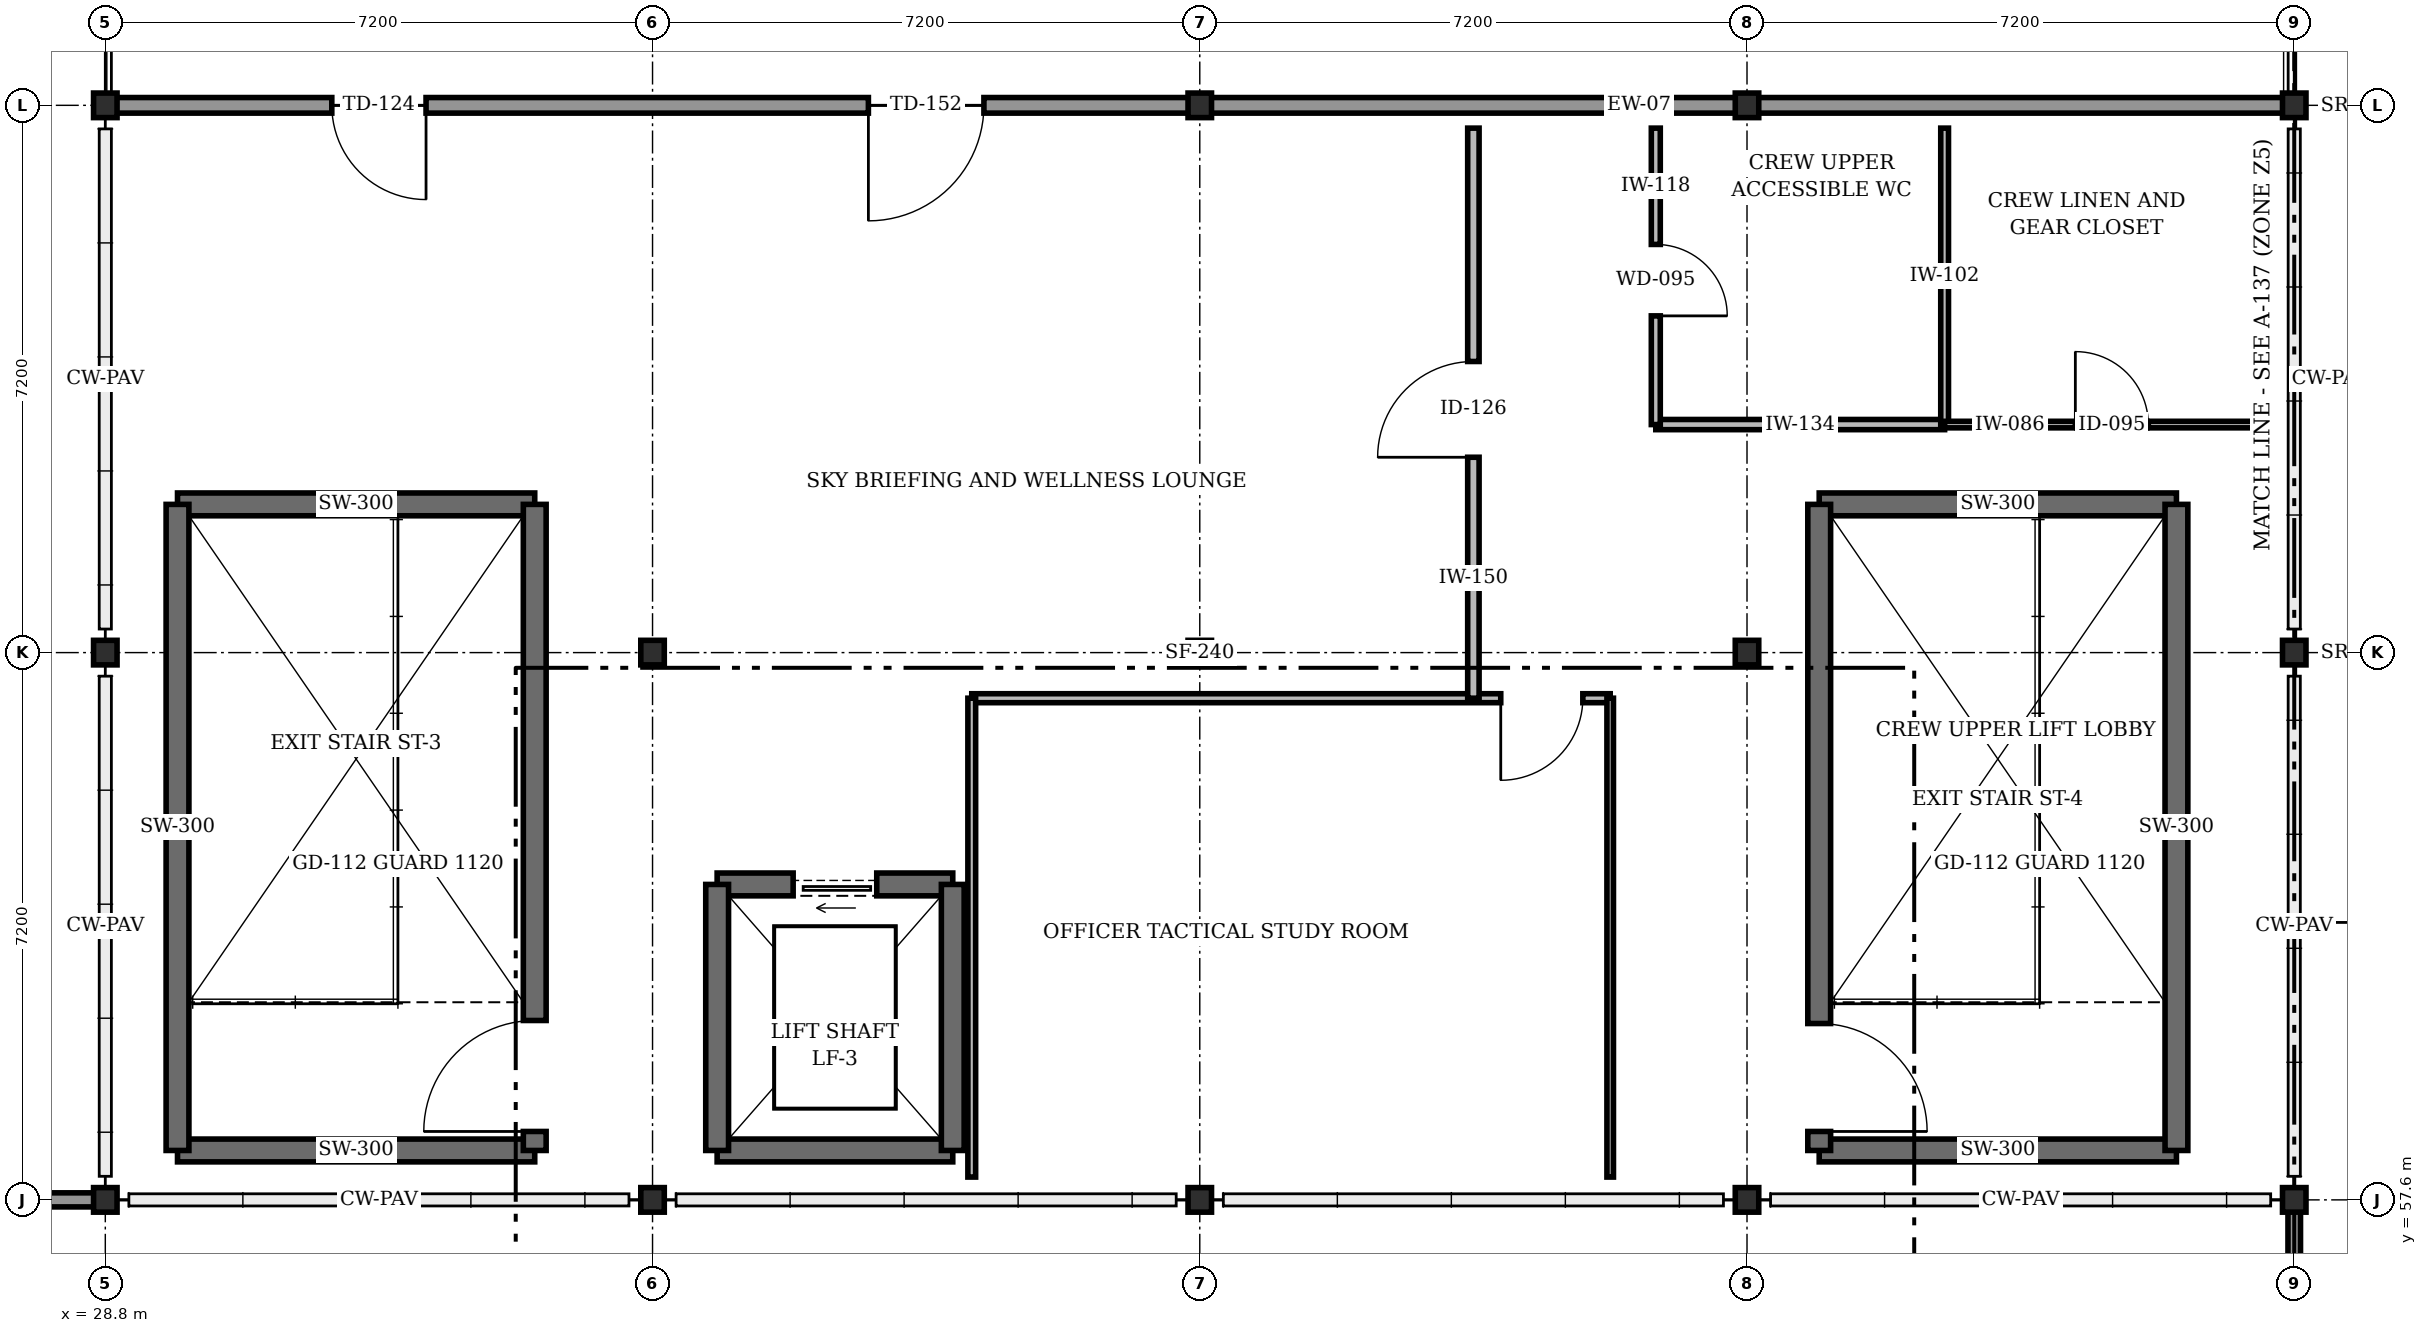
"""IFC4 building model, lengths in metres.
Left out: names, types, materials, properties, quantities, classifications, styles, units other than length and angle.
Written with IfcOpenShell. Run it as: python <this file> out.ifc"""

import sys

from ifc_helpers import new_model, si_unit, direction, frame, frame_2d, origin, origin_2d, place, context, subcontext, project, spatial, rectangle, i_section, extrude, element, fill, save


model = new_model("IFC4")
c1 = context("Model", 3, precision=1e-05, world=origin(), true_north=direction((0.0, 1.0)))
c2 = subcontext(c1, "Body", "Model", "MODEL_VIEW")
j1 = project(units=[si_unit("LENGTHUNIT", "METRE"), si_unit("PLANEANGLEUNIT", "RADIAN")], contexts=[c1])
p1 = place(None, origin())
s1 = spatial("IfcSite", under=j1, at=p1, CompositionType="ELEMENT")
p2 = place(p1, origin())
s2 = spatial("IfcBuilding", under=s1, at=p2, CompositionType="ELEMENT")
p3 = place(p2, frame((0.0, 0.0, 18.0)))
s3 = spatial("IfcBuildingStorey", under=s2, at=p3, CompositionType="ELEMENT", Elevation=18.0)
for number, where, z_axis, x_axis in (
    (1, (28.8, 57.6, 0.0), (0.0, 0.0, 1.0), (1.0, 0.0, 0.0)),
    (2, (28.8, 64.8, 0.0), (0.0, 0.0, 1.0), (1.0, 0.0, 0.0)),
    (3, (28.8, 72.0, 0.0), (0.0, 0.0, 1.0), (1.0, 0.0, 0.0)),
    (4, (36.0, 57.6, 0.0), (0.0, 0.0, 1.0), (1.0, 0.0, 0.0)),
    (5, (36.0, 64.8, 0.0), (0.0, 0.0, 1.0), (1.0, 0.0, 0.0)),
    (6, (43.2, 57.6, 0.0), (0.0, 0.0, 1.0), (1.0, 0.0, 0.0)),
    (7, (43.2, 64.8, 0.0), (0.0, 0.0, 1.0), (1.0, 0.0, 0.0)),
    (8, (43.2, 72.0, 0.0), (0.0, 0.0, 1.0), (1.0, 0.0, 0.0)),
    (9, (50.4, 57.6, 0.0), (0.0, 0.0, 1.0), (1.0, 0.0, 0.0)),
    (10, (50.4, 64.8, 0.0), (0.0, 0.0, 1.0), (1.0, 0.0, 0.0)),
    (11, (50.4, 72.0, 0.0), (0.0, 0.0, 1.0), (1.0, 0.0, 0.0)),
    (12, (57.6, 57.6, 0.0), (0.0, 0.0, 1.0), (1.0, 0.0, 0.0)),
    (13, (57.6, 64.8, 0.0), (0.0, 0.0, 1.0), (1.0, 0.0, 0.0)),
    (14, (57.6, 72.0, 0.0), (0.0, 0.0, 1.0), (1.0, 0.0, 0.0)),
):
    element("IfcColumn", number, at=place(p3, frame(where, z_axis=z_axis, x_axis=x_axis)), inside=s3, PredefinedType="COLUMN", context=c2, shape_type="SweptSolid", body=[
        extrude(i_section(OverallWidth=0.309, OverallDepth=0.323, WebThickness=0.014, FlangeThickness=0.023, at=origin_2d()), origin(), (0.0, 0.0, 1.0), 4.2),
    ])
p4 = place(p3, frame((57.6, 72.0, 0.0), z_axis=(0.0, 0.0, 1.0), x_axis=(-1.0, 0.0, 0.0)))
e15 = element("IfcWall", 15, at=p4, inside=s3, PredefinedType="STANDARD", context=c2, shape_type="SweptSolid", body=[
    extrude(rectangle(XDim=28.8, YDim=0.205, at=frame_2d((14.4, 0.0))), origin(), (0.0, 0.0, 1.0), 3.139),
])
p5 = place(p4, frame((17.24, 0.0, 0.0)))
e16 = element("IfcOpeningElement", 16, at=p5, cuts=e15, PredefinedType="OPENING", context=c2, shape_type="SweptSolid", body=[
    extrude(rectangle(XDim=1.52, YDim=2.26, at=frame_2d((0.76, 1.13))), frame((0.0, 0.113, 0.0), z_axis=(0.0, -1.0, 0.0), x_axis=(1.0, 0.0, 0.0)), (0.0, 0.0, 1.0), 0.225),
])
p6 = place(p4, frame((24.58, 0.0, 0.0)))
e17 = element("IfcOpeningElement", 17, at=p6, cuts=e15, PredefinedType="OPENING", context=c2, shape_type="SweptSolid", body=[
    extrude(rectangle(XDim=1.24, YDim=2.2, at=frame_2d((0.62, 1.1))), frame((0.0, 0.113, 0.0), z_axis=(0.0, -1.0, 0.0), x_axis=(1.0, 0.0, 0.0)), (0.0, 0.0, 1.0), 0.225),
])
p7 = place(p3, frame((28.8, 57.6, 0.0), z_axis=(0.0, 0.0, 1.0), x_axis=(-1.0, 0.0, 0.0)))
e18 = element("IfcWall", 18, at=p7, inside=s3, PredefinedType="PARAPET", context=c2, shape_type="SweptSolid", body=[
    extrude(rectangle(XDim=3.6, YDim=0.185, at=frame_2d((1.8, 0.0))), origin(), (0.0, 0.0, 1.0), 1.15),
])
p8 = place(p3, frame((57.6, 21.6, 0.0), z_axis=(0.0, 0.0, 1.0), x_axis=(0.0, 1.0, 0.0)))
e19 = element("IfcWall", 19, at=p8, inside=s3, PredefinedType="PARAPET", context=c2, shape_type="SweptSolid", body=[
    extrude(rectangle(XDim=36.0, YDim=0.165, at=frame_2d((18.0, 0.0))), origin(), (0.0, 0.0, 1.0), 1.15),
])
for number, where, z_axis, x_axis in (
    (20, (29.75, 58.25, 0.0), (0.0, 0.0, 1.0), (1.0, 0.0, 0.0)),
    (21, (34.45, 66.75, 0.0), (0.0, 0.0, 1.0), (-1.0, 0.0, 0.0)),
):
    element("IfcWall", number, at=place(p3, frame(where, z_axis=z_axis, x_axis=x_axis)), inside=s3, PredefinedType="SHEAR", context=c2, shape_type="SweptSolid", body=[
        extrude(rectangle(XDim=4.7, YDim=0.3, at=frame_2d((2.35, 0.0))), origin(), (0.0, 0.0, 1.0), 3.975),
    ])
p9 = place(p3, frame((29.75, 66.75, 0.0), z_axis=(0.0, 0.0, 1.0), x_axis=(0.0, -1.0, 0.0)))
e22 = element("IfcWall", 22, at=p9, inside=s3, PredefinedType="SHEAR", context=c2, shape_type="SweptSolid", body=[
    extrude(rectangle(XDim=8.5, YDim=0.3, at=frame_2d((4.25, 0.0))), origin(), (0.0, 0.0, 1.0), 3.975),
])
p10 = place(p3, frame((34.45, 58.25, 0.0), z_axis=(0.0, 0.0, 1.0), x_axis=(0.0, 1.0, 0.0)))
e23 = element("IfcWall", 23, at=p10, inside=s3, PredefinedType="SHEAR", context=c2, shape_type="SweptSolid", body=[
    extrude(rectangle(XDim=8.5, YDim=0.3, at=frame_2d((4.25, 0.0))), origin(), (0.0, 0.0, 1.0), 3.975),
])
p11 = place(p10, frame((0.25, 0.0, 0.0)))
e24 = element("IfcOpeningElement", 24, at=p11, cuts=e23, PredefinedType="OPENING", context=c2, shape_type="SweptSolid", body=[
    extrude(rectangle(XDim=1.46, YDim=2.24, at=frame_2d((0.73, 1.12))), frame((0.0, 0.16, 0.0), z_axis=(0.0, -1.0, 0.0), x_axis=(1.0, 0.0, 0.0)), (0.0, 0.0, 1.0), 0.32),
])
p12 = place(p3, frame((36.85, 58.25, 0.0), z_axis=(0.0, 0.0, 1.0), x_axis=(1.0, 0.0, 0.0)))
e25 = element("IfcWall", 25, at=p12, inside=s3, PredefinedType="SHEAR", context=c2, shape_type="SweptSolid", body=[
    extrude(rectangle(XDim=3.1, YDim=0.3, at=frame_2d((1.55, 0.0))), origin(), (0.0, 0.0, 1.0), 3.975),
])
p13 = place(p3, frame((39.95, 61.75, 0.0), z_axis=(0.0, 0.0, 1.0), x_axis=(-1.0, 0.0, 0.0)))
e26 = element("IfcWall", 26, at=p13, inside=s3, PredefinedType="SHEAR", context=c2, shape_type="SweptSolid", body=[
    extrude(rectangle(XDim=3.1, YDim=0.3, at=frame_2d((1.55, 0.0))), origin(), (0.0, 0.0, 1.0), 3.975),
])
p14 = place(p13, frame((1.0, 0.0, 0.0)))
e27 = element("IfcOpeningElement", 27, at=p14, cuts=e26, PredefinedType="OPENING", context=c2, shape_type="SweptSolid", body=[
    extrude(rectangle(XDim=1.1, YDim=2.22, at=frame_2d((0.55, 1.11))), frame((0.0, 0.16, 0.0), z_axis=(0.0, -1.0, 0.0), x_axis=(1.0, 0.0, 0.0)), (0.0, 0.0, 1.0), 0.32),
])
for number, where, z_axis, x_axis in (
    (28, (36.85, 61.75, 0.0), (0.0, 0.0, 1.0), (0.0, -1.0, 0.0)),
    (29, (39.95, 58.25, 0.0), (0.0, 0.0, 1.0), (0.0, 1.0, 0.0)),
):
    element("IfcWall", number, at=place(p3, frame(where, z_axis=z_axis, x_axis=x_axis)), inside=s3, PredefinedType="SHEAR", context=c2, shape_type="SweptSolid", body=[
        extrude(rectangle(XDim=3.5, YDim=0.3, at=frame_2d((1.75, 0.0))), origin(), (0.0, 0.0, 1.0), 3.975),
    ])
for number, where, z_axis, x_axis in (
    (30, (51.35, 58.25, 0.0), (0.0, 0.0, 1.0), (1.0, 0.0, 0.0)),
    (31, (56.05, 66.75, 0.0), (0.0, 0.0, 1.0), (-1.0, 0.0, 0.0)),
):
    element("IfcWall", number, at=place(p3, frame(where, z_axis=z_axis, x_axis=x_axis)), inside=s3, PredefinedType="SHEAR", context=c2, shape_type="SweptSolid", body=[
        extrude(rectangle(XDim=4.7, YDim=0.3, at=frame_2d((2.35, 0.0))), origin(), (0.0, 0.0, 1.0), 3.975),
    ])
p15 = place(p3, frame((51.35, 66.75, 0.0), z_axis=(0.0, 0.0, 1.0), x_axis=(0.0, -1.0, 0.0)))
e32 = element("IfcWall", 32, at=p15, inside=s3, PredefinedType="SHEAR", context=c2, shape_type="SweptSolid", body=[
    extrude(rectangle(XDim=8.5, YDim=0.3, at=frame_2d((4.25, 0.0))), origin(), (0.0, 0.0, 1.0), 3.975),
])
p16 = place(p15, frame((6.83, 0.0, 0.0)))
e33 = element("IfcOpeningElement", 33, at=p16, cuts=e32, PredefinedType="OPENING", context=c2, shape_type="SweptSolid", body=[
    extrude(rectangle(XDim=1.42, YDim=2.22, at=frame_2d((0.71, 1.11))), frame((0.0, 0.16, 0.0), z_axis=(0.0, -1.0, 0.0), x_axis=(1.0, 0.0, 0.0)), (0.0, 0.0, 1.0), 0.32),
])
p17 = place(p3, frame((56.05, 58.25, 0.0), z_axis=(0.0, 0.0, 1.0), x_axis=(0.0, 1.0, 0.0)))
e34 = element("IfcWall", 34, at=p17, inside=s3, PredefinedType="SHEAR", context=c2, shape_type="SweptSolid", body=[
    extrude(rectangle(XDim=8.5, YDim=0.3, at=frame_2d((4.25, 0.0))), origin(), (0.0, 0.0, 1.0), 3.975),
])
p18 = place(p3, frame((48.6, 64.2, 0.0), z_axis=(0.0, 0.0, 1.0), x_axis=(-1.0, 0.0, 0.0)))
e35 = element("IfcWall", 35, at=p18, inside=s3, PredefinedType="STANDARD", context=c2, shape_type="SweptSolid", body=[
    extrude(rectangle(XDim=8.4, YDim=0.118, at=frame_2d((4.2, 0.0))), origin(), (0.0, 0.0, 1.0), 3.457),
])
p19 = place(p18, frame((0.36, 0.0, 0.0)))
e36 = element("IfcOpeningElement", 36, at=p19, cuts=e35, PredefinedType="OPENING", context=c2, shape_type="SweptSolid", body=[
    extrude(rectangle(XDim=1.08, YDim=2.18, at=frame_2d((0.54, 1.09))), frame((0.0, 0.069, 0.0), z_axis=(0.0, -1.0, 0.0), x_axis=(1.0, 0.0, 0.0)), (0.0, 0.0, 1.0), 0.138),
])
p20 = place(p3, frame((40.2, 64.2, 0.0), z_axis=(0.0, 0.0, 1.0), x_axis=(0.0, -1.0, 0.0)))
e37 = element("IfcWall", 37, at=p20, inside=s3, PredefinedType="STANDARD", context=c2, shape_type="SweptSolid", body=[
    extrude(rectangle(XDim=6.3, YDim=0.102, at=frame_2d((3.15, 0.0))), origin(), (0.0, 0.0, 1.0), 3.975),
])
p21 = place(p3, frame((48.6, 57.9, 0.0), z_axis=(0.0, 0.0, 1.0), x_axis=(0.0, 1.0, 0.0)))
e38 = element("IfcWall", 38, at=p21, inside=s3, PredefinedType="STANDARD", context=c2, shape_type="SweptSolid", body=[
    extrude(rectangle(XDim=6.3, YDim=0.086, at=frame_2d((3.15, 0.0))), origin(), (0.0, 0.0, 1.0), 3.975),
])
p22 = place(p3, frame((46.8, 64.2, 0.0), z_axis=(0.0, 0.0, 1.0), x_axis=(0.0, 1.0, 0.0)))
e39 = element("IfcWall", 39, at=p22, inside=s3, PredefinedType="STANDARD", context=c2, shape_type="SweptSolid", body=[
    extrude(rectangle(XDim=7.5, YDim=0.15, at=frame_2d((3.75, 0.0))), origin(), (0.0, 0.0, 1.0), 3.457),
])
p23 = place(p22, frame((3.17, 0.0, 0.0)))
e40 = element("IfcOpeningElement", 40, at=p23, cuts=e39, PredefinedType="OPENING", context=c2, shape_type="SweptSolid", body=[
    extrude(rectangle(XDim=1.26, YDim=2.24, at=frame_2d((0.63, 1.12))), frame((0.0, 0.085, 0.0), z_axis=(0.0, -1.0, 0.0), x_axis=(1.0, 0.0, 0.0)), (0.0, 0.0, 1.0), 0.17),
])
p24 = place(p3, frame((49.2, 67.8, 0.0), z_axis=(0.0, 0.0, 1.0), x_axis=(1.0, 0.0, 0.0)))
e41 = element("IfcWall", 41, at=p24, inside=s3, PredefinedType="STANDARD", context=c2, shape_type="SweptSolid", body=[
    extrude(rectangle(XDim=3.8, YDim=0.134, at=frame_2d((1.9, 0.0))), origin(), (0.0, 0.0, 1.0), 3.457),
])
p25 = place(p3, frame((49.2, 71.7, 0.0), z_axis=(0.0, 0.0, 1.0), x_axis=(0.0, -1.0, 0.0)))
e42 = element("IfcWall", 42, at=p25, inside=s3, PredefinedType="STANDARD", context=c2, shape_type="SweptSolid", body=[
    extrude(rectangle(XDim=3.9, YDim=0.118, at=frame_2d((1.95, 0.0))), origin(), (0.0, 0.0, 1.0), 3.975),
])
p26 = place(p25, frame((1.53, 0.0, 0.0)))
e43 = element("IfcOpeningElement", 43, at=p26, cuts=e42, PredefinedType="OPENING", context=c2, shape_type="SweptSolid", body=[
    extrude(rectangle(XDim=0.94, YDim=2.12, at=frame_2d((0.47, 1.06))), frame((0.0, 0.069, 0.0), z_axis=(0.0, -1.0, 0.0), x_axis=(1.0, 0.0, 0.0)), (0.0, 0.0, 1.0), 0.138),
])
p27 = place(p3, frame((53.0, 67.8, 0.0), z_axis=(0.0, 0.0, 1.0), x_axis=(0.0, 1.0, 0.0)))
e44 = element("IfcWall", 44, at=p27, inside=s3, PredefinedType="STANDARD", context=c2, shape_type="SweptSolid", body=[
    extrude(rectangle(XDim=3.9, YDim=0.102, at=frame_2d((1.95, 0.0))), origin(), (0.0, 0.0, 1.0), 3.975),
])
p28 = place(p3, frame((53.0, 67.8, 0.0), z_axis=(0.0, 0.0, 1.0), x_axis=(1.0, 0.0, 0.0)))
e45 = element("IfcWall", 45, at=p28, inside=s3, PredefinedType="STANDARD", context=c2, shape_type="SweptSolid", body=[
    extrude(rectangle(XDim=4.3, YDim=0.086, at=frame_2d((2.15, 0.0))), origin(), (0.0, 0.0, 1.0), 3.632),
])
p29 = place(p28, frame((1.72, 0.0, 0.0)))
e46 = element("IfcOpeningElement", 46, at=p29, cuts=e45, PredefinedType="OPENING", context=c2, shape_type="SweptSolid", body=[
    extrude(rectangle(XDim=0.96, YDim=2.14, at=frame_2d((0.48, 1.07))), frame((0.0, 0.053, 0.0), z_axis=(0.0, -1.0, 0.0), x_axis=(1.0, 0.0, 0.0)), (0.0, 0.0, 1.0), 0.106),
])
p30 = place(p5, origin())
e47 = element("IfcDoor", 47, at=p30, inside=s3, OperationType="SINGLE_SWING_RIGHT", PredefinedType="DOOR", context=c2, shape_type="SweptSolid", body=[
    extrude(rectangle(XDim=1.52, YDim=2.26, at=frame_2d((0.76, 1.13))), frame((0.0, 0.025, 0.0), z_axis=(0.0, -1.0, 0.0), x_axis=(1.0, 0.0, 0.0)), (0.0, 0.0, 1.0), 0.05),
])
fill(e16, e47)
p31 = place(p6, origin())
e48 = element("IfcDoor", 48, at=p31, inside=s3, OperationType="SINGLE_SWING_LEFT", PredefinedType="DOOR", context=c2, shape_type="SweptSolid", body=[
    extrude(rectangle(XDim=1.24, YDim=2.2, at=frame_2d((0.62, 1.1))), frame((0.0, 0.025, 0.0), z_axis=(0.0, -1.0, 0.0), x_axis=(1.0, 0.0, 0.0)), (0.0, 0.0, 1.0), 0.05),
])
fill(e17, e48)
p32 = place(p11, origin())
e49 = element("IfcDoor", 49, at=p32, inside=s3, OperationType="SINGLE_SWING_LEFT", PredefinedType="DOOR", context=c2, shape_type="SweptSolid", body=[
    extrude(rectangle(XDim=1.46, YDim=2.24, at=frame_2d((0.73, 1.12))), frame((0.0, 0.025, 0.0), z_axis=(0.0, -1.0, 0.0), x_axis=(1.0, 0.0, 0.0)), (0.0, 0.0, 1.0), 0.05),
])
fill(e24, e49)
p33 = place(p14, origin())
e50 = element("IfcDoor", 50, at=p33, inside=s3, OperationType="SLIDING_TO_LEFT", PredefinedType="DOOR", context=c2, shape_type="SweptSolid", body=[
    extrude(rectangle(XDim=1.1, YDim=2.22, at=frame_2d((0.55, 1.11))), frame((0.0, 0.025, 0.0), z_axis=(0.0, -1.0, 0.0), x_axis=(1.0, 0.0, 0.0)), (0.0, 0.0, 1.0), 0.05),
])
fill(e27, e50)
p34 = place(p16, origin())
e51 = element("IfcDoor", 51, at=p34, inside=s3, OperationType="SINGLE_SWING_RIGHT", PredefinedType="DOOR", context=c2, shape_type="SweptSolid", body=[
    extrude(rectangle(XDim=1.42, YDim=2.22, at=frame_2d((0.71, 1.11))), frame((0.0, 0.025, 0.0), z_axis=(0.0, -1.0, 0.0), x_axis=(1.0, 0.0, 0.0)), (0.0, 0.0, 1.0), 0.05),
])
fill(e33, e51)
p35 = place(p19, origin())
e52 = element("IfcDoor", 52, at=p35, inside=s3, OperationType="SINGLE_SWING_RIGHT", PredefinedType="DOOR", context=c2, shape_type="SweptSolid", body=[
    extrude(rectangle(XDim=1.08, YDim=2.18, at=frame_2d((0.54, 1.09))), frame((0.0, 0.025, 0.0), z_axis=(0.0, -1.0, 0.0), x_axis=(1.0, 0.0, 0.0)), (0.0, 0.0, 1.0), 0.05),
])
fill(e36, e52)
p36 = place(p23, origin())
e53 = element("IfcDoor", 53, at=p36, inside=s3, OperationType="SINGLE_SWING_LEFT", PredefinedType="DOOR", context=c2, shape_type="SweptSolid", body=[
    extrude(rectangle(XDim=1.26, YDim=2.24, at=frame_2d((0.63, 1.12))), frame((0.0, 0.025, 0.0), z_axis=(0.0, -1.0, 0.0), x_axis=(1.0, 0.0, 0.0)), (0.0, 0.0, 1.0), 0.05),
])
fill(e40, e53)
p37 = place(p26, origin())
e54 = element("IfcDoor", 54, at=p37, inside=s3, OperationType="SINGLE_SWING_RIGHT", PredefinedType="DOOR", context=c2, shape_type="SweptSolid", body=[
    extrude(rectangle(XDim=0.94, YDim=2.12, at=frame_2d((0.47, 1.06))), frame((0.0, 0.025, 0.0), z_axis=(0.0, -1.0, 0.0), x_axis=(1.0, 0.0, 0.0)), (0.0, 0.0, 1.0), 0.05),
])
fill(e43, e54)
p38 = place(p29, origin())
e55 = element("IfcDoor", 55, at=p38, inside=s3, OperationType="SINGLE_SWING_LEFT", PredefinedType="DOOR", context=c2, shape_type="SweptSolid", body=[
    extrude(rectangle(XDim=0.96, YDim=2.14, at=frame_2d((0.48, 1.07))), frame((0.0, 0.025, 0.0), z_axis=(0.0, -1.0, 0.0), x_axis=(1.0, 0.0, 0.0)), (0.0, 0.0, 1.0), 0.05),
])
fill(e46, e55)
save(model, sys.argv[1])
